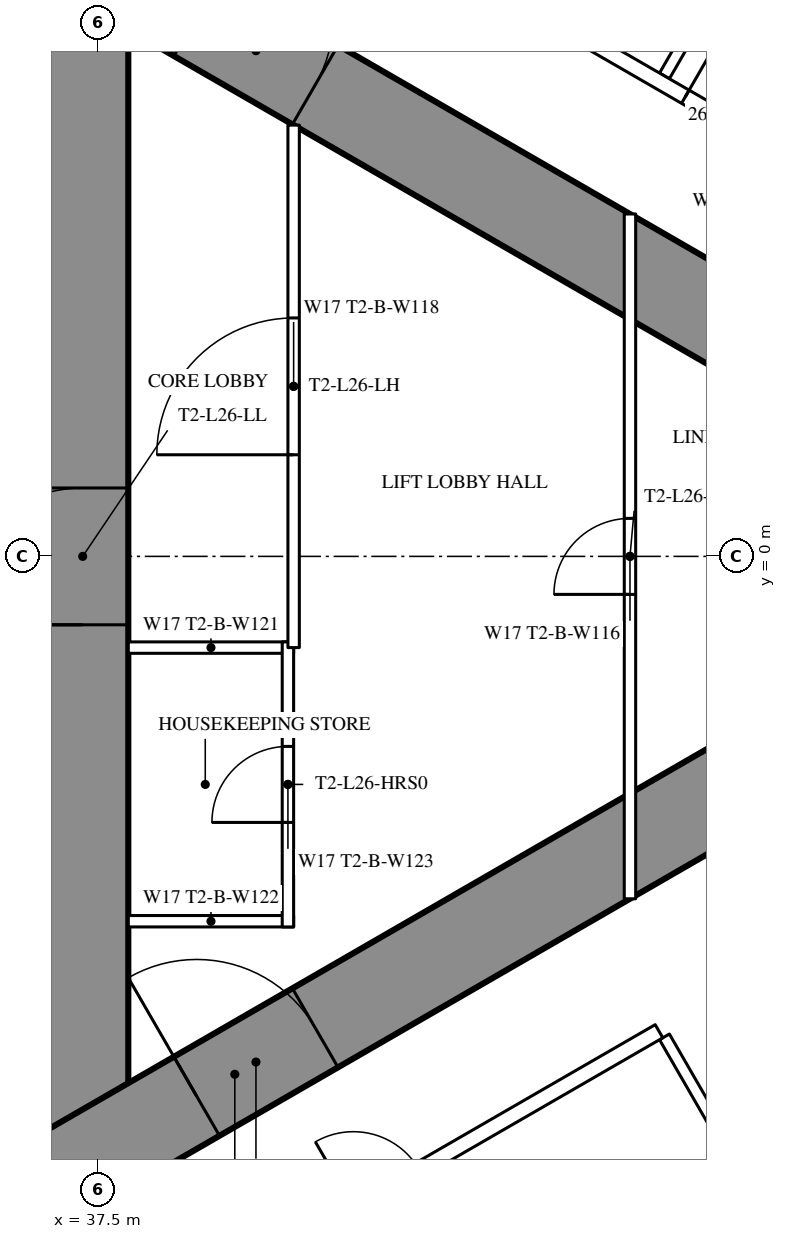
"""IFC4 building model, lengths in metres.
Left out: names, types, materials, properties, quantities, classifications, styles, units other than length and angle.
Written with IfcOpenShell. Run it as: python <this file> out.ifc"""

import sys

from ifc_helpers import new_model, si_unit, direction, frame, frame_2d, origin, place, context, subcontext, project, spatial, rectangle, extrude, element, fill, save


model = new_model("IFC4")
c1 = context("Model", 3, precision=1e-05, world=origin(), true_north=direction((0.0, 1.0)))
c2 = subcontext(c1, "Body", "Model", "MODEL_VIEW")
j1 = project(units=[si_unit("LENGTHUNIT", "METRE"), si_unit("PLANEANGLEUNIT", "RADIAN")], contexts=[c1])
p1 = place(None, origin())
s1 = spatial("IfcSite", under=j1, at=p1, CompositionType="ELEMENT")
p2 = place(p1, origin())
s2 = spatial("IfcBuilding", under=s1, at=p2, CompositionType="ELEMENT")
p3 = place(p2, frame((0.0, 0.0, 101.1)))
s3 = spatial("IfcBuildingStorey", under=s2, at=p3, CompositionType="ELEMENT", Elevation=101.1)
p4 = place(p3, frame((37.3, -8.6, 0.0), z_axis=(0.0, 0.0, 1.0), x_axis=(0.0, 1.0, 0.0)))
e1 = element("IfcWall", 1, at=p4, inside=s3, PredefinedType="SHEAR", context=c2, shape_type="SweptSolid", body=[
    extrude(rectangle(XDim=17.2, YDim=1.2, at=frame_2d((8.6, 0.0))), origin(), (0.0, 0.0, 1.0), 3.5),
])
p5 = place(p4, frame((7.7, 0.0, 0.0)))
e2 = element("IfcOpeningElement", 2, at=p5, cuts=e1, PredefinedType="OPENING", context=c2, shape_type="SweptSolid", body=[
    extrude(rectangle(XDim=1.8, YDim=2.2, at=frame_2d((0.9, 1.1))), frame((0.0, 0.61, 0.0), z_axis=(0.0, -1.0, 0.0), x_axis=(1.0, 0.0, 0.0)), (0.0, 0.0, 1.0), 1.22),
])
p6 = place(p3, frame((27.2, -13.8, 0.0), z_axis=(0.0, 0.0, 1.0), x_axis=(0.866027159892, 0.499996958321, 0.0)))
e3 = element("IfcWall", 3, at=p6, inside=s3, PredefinedType="SHEAR", context=c2, shape_type="SweptSolid", body=[
    extrude(rectangle(XDim=27.947, YDim=1.2, at=frame_2d((13.973, 0.0))), origin(), (0.0, 0.0, 1.0), 3.5),
])
p7 = place(p6, frame((4.6, 0.0, 0.0)))
e4 = element("IfcOpeningElement", 4, at=p7, cuts=e3, PredefinedType="OPENING", context=c2, shape_type="SweptSolid", body=[
    extrude(rectangle(XDim=1.0, YDim=2.2, at=frame_2d((0.5, 1.1))), frame((0.0, 0.61, 0.0), z_axis=(0.0, -1.0, 0.0), x_axis=(1.0, 0.0, 0.0)), (0.0, 0.0, 1.0), 1.22),
])
p8 = place(p6, frame((13.395, 0.0, 0.0)))
e5 = element("IfcOpeningElement", 5, at=p8, cuts=e3, PredefinedType="OPENING", context=c2, shape_type="SweptSolid", body=[
    extrude(rectangle(XDim=1.8, YDim=2.2, at=frame_2d((0.9, 1.1))), frame((0.0, 0.61, 0.0), z_axis=(0.0, -1.0, 0.0), x_axis=(1.0, 0.0, 0.0)), (0.0, 0.0, 1.0), 1.22),
])
p9 = place(p3, frame((27.2, 13.8, 0.0), z_axis=(0.0, 0.0, 1.0), x_axis=(0.866024515034, -0.500001539357, 0.0)))
e6 = element("IfcWall", 6, at=p9, inside=s3, PredefinedType="SHEAR", context=c2, shape_type="SweptSolid", body=[
    extrude(rectangle(XDim=26.907, YDim=1.2, at=frame_2d((13.454, 0.0))), origin(), (0.0, 0.0, 1.0), 3.5),
])
p10 = place(p9, frame((4.6, 0.0, 0.0)))
e7 = element("IfcOpeningElement", 7, at=p10, cuts=e6, PredefinedType="OPENING", context=c2, shape_type="SweptSolid", body=[
    extrude(rectangle(XDim=1.0, YDim=2.2, at=frame_2d((0.5, 1.1))), frame((0.0, 0.61, 0.0), z_axis=(0.0, -1.0, 0.0), x_axis=(1.0, 0.0, 0.0)), (0.0, 0.0, 1.0), 1.22),
])
p11 = place(p9, frame((13.395, 0.0, 0.0)))
e8 = element("IfcOpeningElement", 8, at=p11, cuts=e6, PredefinedType="OPENING", context=c2, shape_type="SweptSolid", body=[
    extrude(rectangle(XDim=1.8, YDim=2.2, at=frame_2d((0.9, 1.1))), frame((0.0, 0.61, 0.0), z_axis=(0.0, -1.0, 0.0), x_axis=(1.0, 0.0, 0.0)), (0.0, 0.0, 1.0), 1.22),
])
p12 = place(p3, frame((44.954, -6.321, 0.0), z_axis=(0.0, 0.0, 1.0), x_axis=(0.500018676722, -0.866014620505, 0.0)))
e9 = element("IfcWall", 9, at=p12, inside=s3, PredefinedType="PARTITIONING", context=c2, shape_type="SweptSolid", body=[
    extrude(rectangle(XDim=8.704, YDim=0.15, at=frame_2d((4.352, 0.0))), origin(), (0.0, 0.0, 1.0), 2.2),
])
p13 = place(p3, frame((44.954, 6.321, 0.0), z_axis=(0.0, 0.0, 1.0), x_axis=(0.500009815811, 0.866019736549, 0.0)))
e10 = element("IfcWall", 10, at=p13, inside=s3, PredefinedType="PARTITIONING", context=c2, shape_type="SweptSolid", body=[
    extrude(rectangle(XDim=11.424, YDim=0.15, at=frame_2d((5.712, 0.0))), origin(), (0.0, 0.0, 1.0), 3.25),
])
p14 = place(p3, frame((36.834, 10.894, 0.0), z_axis=(0.0, 0.0, 1.0), x_axis=(0.866028157229, -0.499995230863, 0.0)))
e11 = element("IfcWall", 11, at=p14, inside=s3, PredefinedType="PARTITIONING", context=c2, shape_type="SweptSolid", body=[
    extrude(rectangle(XDim=21.667, YDim=0.2, at=frame_2d((10.833, 0.0))), origin(), (0.0, 0.0, 1.0), 3.25),
])
p15 = place(p14, frame((20.117, 0.0, 0.0)))
e12 = element("IfcOpeningElement", 12, at=p15, cuts=e11, PredefinedType="OPENING", context=c2, shape_type="SweptSolid", body=[
    extrude(rectangle(XDim=0.95, YDim=2.2, at=frame_2d((0.475, 1.1))), frame((0.0, 0.11, 0.0), z_axis=(0.0, -1.0, 0.0), x_axis=(1.0, 0.0, 0.0)), (0.0, 0.0, 1.0), 0.22),
])
p16 = place(p14, frame((14.335, 0.0, 0.0)))
e13 = element("IfcOpeningElement", 13, at=p16, cuts=e11, PredefinedType="OPENING", context=c2, shape_type="SweptSolid", body=[
    extrude(rectangle(XDim=0.95, YDim=2.2, at=frame_2d((0.475, 1.1))), frame((0.0, 0.11, 0.0), z_axis=(0.0, -1.0, 0.0), x_axis=(1.0, 0.0, 0.0)), (0.0, 0.0, 1.0), 0.22),
])
p17 = place(p14, frame((9.693, 0.0, 0.0)))
e14 = element("IfcOpeningElement", 14, at=p17, cuts=e11, PredefinedType="OPENING", context=c2, shape_type="SweptSolid", body=[
    extrude(rectangle(XDim=0.95, YDim=2.2, at=frame_2d((0.475, 1.1))), frame((0.0, 0.11, 0.0), z_axis=(0.0, -1.0, 0.0), x_axis=(1.0, 0.0, 0.0)), (0.0, 0.0, 1.0), 0.22),
])
p18 = place(p14, frame((2.95, 0.0, 0.0)))
e15 = element("IfcOpeningElement", 15, at=p18, cuts=e11, PredefinedType="OPENING", context=c2, shape_type="SweptSolid", body=[
    extrude(rectangle(XDim=0.95, YDim=2.2, at=frame_2d((0.475, 1.1))), frame((0.0, 0.11, 0.0), z_axis=(0.0, -1.0, 0.0), x_axis=(1.0, 0.0, 0.0)), (0.0, 0.0, 1.0), 0.22),
])
p19 = place(p3, frame((37.96, -10.243, 0.0), z_axis=(0.0, 0.0, 1.0), x_axis=(0.86603350054, 0.499985975746, 0.0)))
e16 = element("IfcWall", 16, at=p19, inside=s3, PredefinedType="PARTITIONING", context=c2, shape_type="SweptSolid", body=[
    extrude(rectangle(XDim=7.993, YDim=0.2, at=frame_2d((3.997, 0.0))), origin(), (0.0, 0.0, 1.0), 3.25),
])
p20 = place(p19, frame((3.35, 0.0, 0.0)))
e17 = element("IfcOpeningElement", 17, at=p20, cuts=e16, PredefinedType="OPENING", context=c2, shape_type="SweptSolid", body=[
    extrude(rectangle(XDim=1.0, YDim=2.2, at=frame_2d((0.5, 1.1))), frame((0.0, 0.11, 0.0), z_axis=(0.0, -1.0, 0.0), x_axis=(1.0, 0.0, 0.0)), (0.0, 0.0, 1.0), 0.22),
])
for number, where, z_axis, x_axis in (
    (18, (37.9, -1.2, 0.0), (0.0, 0.0, 1.0), (1.0, 0.0, 0.0)),
    (19, (37.9, -4.8, 0.0), (0.0, 0.0, 1.0), (1.0, 0.0, 0.0)),
):
    element("IfcWall", number, at=place(p3, frame(where, z_axis=z_axis, x_axis=x_axis)), inside=s3, PredefinedType="PARTITIONING", context=c2, shape_type="SweptSolid", body=[
        extrude(rectangle(XDim=2.175, YDim=0.15, at=frame_2d((1.087, 0.0))), origin(), (0.0, 0.0, 1.0), 3.25),
    ])
p21 = place(p3, frame((40.0, -4.875, 0.0), z_axis=(0.0, 0.0, 1.0), x_axis=(0.0, 1.0, 0.0)))
e20 = element("IfcWall", 20, at=p21, inside=s3, PredefinedType="PARTITIONING", context=c2, shape_type="SweptSolid", body=[
    extrude(rectangle(XDim=3.75, YDim=0.15, at=frame_2d((1.875, 0.0))), origin(), (0.0, 0.0, 1.0), 3.25),
])
p22 = place(p21, frame((1.375, 0.0, 0.0)))
e21 = element("IfcOpeningElement", 21, at=p22, cuts=e20, PredefinedType="OPENING", context=c2, shape_type="SweptSolid", body=[
    extrude(rectangle(XDim=1.0, YDim=2.2, at=frame_2d((0.5, 1.1))), frame((0.0, 0.085, 0.0), z_axis=(0.0, -1.0, 0.0), x_axis=(1.0, 0.0, 0.0)), (0.0, 0.0, 1.0), 0.17),
])
p23 = place(p3, frame((40.075, -1.2, 0.0), z_axis=(0.0, 0.0, 1.0), x_axis=(0.0, 1.0, 0.0)))
e22 = element("IfcWall", 22, at=p23, inside=s3, PredefinedType="PARTITIONING", context=c2, shape_type="SweptSolid", body=[
    extrude(rectangle(XDim=6.874, YDim=0.15, at=frame_2d((3.437, 0.0))), origin(), (0.0, 0.0, 1.0), 3.25),
])
p24 = place(p23, frame((2.537, 0.0, 0.0)))
e23 = element("IfcOpeningElement", 23, at=p24, cuts=e22, PredefinedType="OPENING", context=c2, shape_type="SweptSolid", body=[
    extrude(rectangle(XDim=1.8, YDim=2.2, at=frame_2d((0.9, 1.1))), frame((0.0, 0.085, 0.0), z_axis=(0.0, -1.0, 0.0), x_axis=(1.0, 0.0, 0.0)), (0.0, 0.0, 1.0), 0.17),
])
p25 = place(p3, frame((44.5, -4.505, 0.0), z_axis=(0.0, 0.0, 1.0), x_axis=(0.0, 1.0, 0.0)))
e24 = element("IfcWall", 24, at=p25, inside=s3, PredefinedType="PARTITIONING", context=c2, shape_type="SweptSolid", body=[
    extrude(rectangle(XDim=9.009, YDim=0.15, at=frame_2d((4.505, 0.0))), origin(), (0.0, 0.0, 1.0), 2.45),
])
p26 = place(p25, frame((4.005, 0.0, 0.0)))
e25 = element("IfcOpeningElement", 25, at=p26, cuts=e24, PredefinedType="OPENING", context=c2, shape_type="SweptSolid", body=[
    extrude(rectangle(XDim=1.0, YDim=2.2, at=frame_2d((0.5, 1.1))), frame((0.0, 0.085, 0.0), z_axis=(0.0, -1.0, 0.0), x_axis=(1.0, 0.0, 0.0)), (0.0, 0.0, 1.0), 0.17),
])
p27 = place(p17, origin())
e26 = element("IfcDoor", 26, at=p27, inside=s3, OperationType="SINGLE_SWING_LEFT", PredefinedType="DOOR", context=c2, shape_type="SweptSolid", body=[
    extrude(rectangle(XDim=0.95, YDim=2.2, at=frame_2d((0.475, 1.1))), frame((0.0, 0.025, 0.0), z_axis=(0.0, -1.0, 0.0), x_axis=(1.0, 0.0, 0.0)), (0.0, 0.0, 1.0), 0.05),
])
fill(e14, e26)
p28 = place(p22, origin())
e27 = element("IfcDoor", 27, at=p28, inside=s3, OperationType="SINGLE_SWING_LEFT", PredefinedType="DOOR", context=c2, shape_type="SweptSolid", body=[
    extrude(rectangle(XDim=1.0, YDim=2.2, at=frame_2d((0.5, 1.1))), frame((0.0, 0.025, 0.0), z_axis=(0.0, -1.0, 0.0), x_axis=(1.0, 0.0, 0.0)), (0.0, 0.0, 1.0), 0.05),
])
fill(e21, e27)
p29 = place(p24, origin())
e28 = element("IfcDoor", 28, at=p29, inside=s3, OperationType="DOUBLE_DOOR_SINGLE_SWING", PredefinedType="DOOR", context=c2, shape_type="SweptSolid", body=[
    extrude(rectangle(XDim=1.8, YDim=2.2, at=frame_2d((0.9, 1.1))), frame((0.0, 0.025, 0.0), z_axis=(0.0, -1.0, 0.0), x_axis=(1.0, 0.0, 0.0)), (0.0, 0.0, 1.0), 0.05),
])
fill(e23, e28)
p30 = place(p26, origin())
e29 = element("IfcDoor", 29, at=p30, inside=s3, OperationType="SINGLE_SWING_LEFT", PredefinedType="DOOR", context=c2, shape_type="SweptSolid", body=[
    extrude(rectangle(XDim=1.0, YDim=2.2, at=frame_2d((0.5, 1.1))), frame((0.0, 0.025, 0.0), z_axis=(0.0, -1.0, 0.0), x_axis=(1.0, 0.0, 0.0)), (0.0, 0.0, 1.0), 0.05),
])
fill(e25, e29)
p31 = place(p8, origin())
e30 = element("IfcDoor", 30, at=p31, inside=s3, OperationType="DOUBLE_DOOR_SINGLE_SWING", PredefinedType="DOOR", context=c2, shape_type="SweptSolid", body=[
    extrude(rectangle(XDim=1.8, YDim=2.2, at=frame_2d((0.9, 1.1))), frame((0.0, 0.025, 0.0), z_axis=(0.0, -1.0, 0.0), x_axis=(1.0, 0.0, 0.0)), (0.0, 0.0, 1.0), 0.05),
])
fill(e5, e30)
p32 = place(p11, origin())
e31 = element("IfcDoor", 31, at=p32, inside=s3, OperationType="DOUBLE_DOOR_SINGLE_SWING", PredefinedType="DOOR", context=c2, shape_type="SweptSolid", body=[
    extrude(rectangle(XDim=1.8, YDim=2.2, at=frame_2d((0.9, 1.1))), frame((0.0, 0.025, 0.0), z_axis=(0.0, -1.0, 0.0), x_axis=(1.0, 0.0, 0.0)), (0.0, 0.0, 1.0), 0.05),
])
fill(e8, e31)
p33 = place(p5, origin())
e32 = element("IfcDoor", 32, at=p33, inside=s3, OperationType="DOUBLE_DOOR_SINGLE_SWING", PredefinedType="DOOR", context=c2, shape_type="SweptSolid", body=[
    extrude(rectangle(XDim=1.8, YDim=2.2, at=frame_2d((0.9, 1.1))), frame((0.0, 0.025, 0.0), z_axis=(0.0, -1.0, 0.0), x_axis=(1.0, 0.0, 0.0)), (0.0, 0.0, 1.0), 0.05),
])
fill(e2, e32)
save(model, sys.argv[1])
